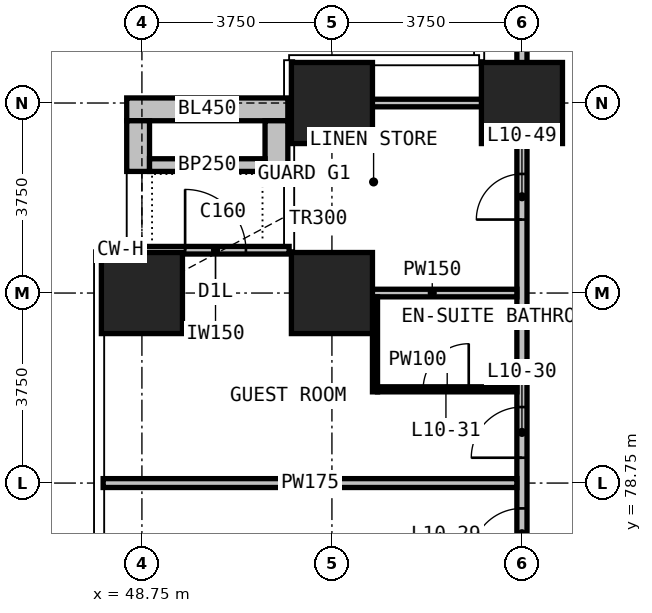
"""IFC4 building model, lengths in metres.
Left out: names, types, materials, properties, quantities, classifications, styles, units other than length and angle.
Written with IfcOpenShell. Run it as: python <this file> out.ifc"""

import sys

from ifc_helpers import new_model, si_unit, direction, frame, frame_2d, origin, origin_2d, place, context, subcontext, project, spatial, rectangle, extrude, element, fill, save


model = new_model("IFC4")
c1 = context("Model", 3, precision=1e-05, world=origin(), true_north=direction((0.0, 1.0)))
c2 = subcontext(c1, "Body", "Model", "MODEL_VIEW")
j1 = project(units=[si_unit("LENGTHUNIT", "METRE"), si_unit("PLANEANGLEUNIT", "RADIAN")], contexts=[c1])
p1 = place(None, origin())
s1 = spatial("IfcSite", under=j1, at=p1, CompositionType="ELEMENT")
p2 = place(p1, origin())
s2 = spatial("IfcBuilding", under=s1, at=p2, CompositionType="ELEMENT")
p3 = place(p2, frame((0.0, 0.0, 52.7)))
s3 = spatial("IfcBuildingStorey", under=s2, at=p3, CompositionType="ELEMENT", Elevation=52.7)
for number, where, z_axis, x_axis in (
    (1, (48.75, 82.5, 0.0), (0.0, 0.0, 1.0), (1.0, 0.0, 0.0)),
    (2, (52.5, 82.5, 0.0), (0.0, 0.0, 1.0), (1.0, 0.0, 0.0)),
    (3, (52.5, 86.25, 0.0), (0.0, 0.0, 1.0), (1.0, 0.0, 0.0)),
    (4, (56.25, 86.25, 0.0), (0.0, 0.0, 1.0), (1.0, 0.0, 0.0)),
):
    element("IfcColumn", number, at=place(p3, frame(where, z_axis=z_axis, x_axis=x_axis)), inside=s3, PredefinedType="COLUMN", context=c2, shape_type="SweptSolid", body=[
        extrude(rectangle(XDim=1.6, YDim=1.6, at=origin_2d()), origin(), (0.0, 0.0, 1.0), 3.3),
    ])
p4 = place(p3, frame((48.75, 83.345, 0.0), z_axis=(0.0, 0.0, 1.0), x_axis=(1.0, 0.0, 0.0)))
e5 = element("IfcWall", 5, at=p4, inside=s3, PredefinedType="SOLIDWALL", context=c2, shape_type="SweptSolid", body=[
    extrude(rectangle(XDim=2.905, YDim=0.15, at=frame_2d((1.453, 0.0))), origin(), (0.0, 0.0, 1.0), 3.0),
])
p5 = place(p4, frame((0.853, 0.0, 0.0)))
e6 = element("IfcOpeningElement", 6, at=p5, cuts=e5, PredefinedType="OPENING", context=c2, shape_type="SweptSolid", body=[
    extrude(rectangle(XDim=1.2, YDim=2.0, at=frame_2d((0.6, 1.0))), frame((0.0, 0.085, 0.0), z_axis=(0.0, -1.0, 0.0), x_axis=(1.0, 0.0, 0.0)), (0.0, 0.0, 1.0), 0.17),
])
p6 = place(p3, frame((48.45, 86.125, 0.0), z_axis=(0.0, 0.0, 1.0), x_axis=(1.0, 0.0, 0.0)))
e7 = element("IfcWall", 7, at=p6, inside=s3, PredefinedType="USERDEFINED", context=c2, shape_type="SweptSolid", body=[
    extrude(rectangle(XDim=3.18, YDim=0.45, at=frame_2d((1.59, 0.0))), origin(), (0.0, 0.0, 1.0), 1.1),
])
for number, where, z_axis, x_axis in (
    (8, (48.675, 84.9, 0.0), (0.0, 0.0, 1.0), (0.0, 1.0, 0.0)),
    (9, (51.405, 84.9, 0.0), (0.0, 0.0, 1.0), (0.0, 1.0, 0.0)),
):
    element("IfcWall", number, at=place(p3, frame(where, z_axis=z_axis, x_axis=x_axis)), inside=s3, PredefinedType="USERDEFINED", context=c2, shape_type="SweptSolid", body=[
        extrude(rectangle(XDim=1.0, YDim=0.45, at=frame_2d((0.5, 0.0))), origin(), (0.0, 0.0, 1.0), 1.1),
    ])
p7 = place(p3, frame((48.9, 85.025, 0.0), z_axis=(0.0, 0.0, 1.0), x_axis=(1.0, 0.0, 0.0)))
e10 = element("IfcWall", 10, at=p7, inside=s3, PredefinedType="USERDEFINED", context=c2, shape_type="SweptSolid", body=[
    extrude(rectangle(XDim=2.28, YDim=0.25, at=frame_2d((1.14, 0.0))), origin(), (0.0, 0.0, 1.0), 1.0),
])
p8 = place(p3, frame((56.25, 52.4, 0.0), z_axis=(0.0, 0.0, 1.0), x_axis=(0.0, 1.0, 0.0)))
e11 = element("IfcWall", 11, at=p8, inside=s3, PredefinedType="PARTITIONING", context=c2, shape_type="SweptSolid", body=[
    extrude(rectangle(XDim=33.925, YDim=0.2, at=frame_2d((16.962, 0.0))), origin(), (0.0, 0.0, 1.0), 3.0),
])
p9 = place(p8, frame((2.35, 0.0, 0.0)))
e12 = element("IfcOpeningElement", 12, at=p9, cuts=e11, PredefinedType="OPENING", context=c2, shape_type="SweptSolid", body=[
    extrude(rectangle(XDim=1.0, YDim=2.2, at=frame_2d((0.5, 1.1))), frame((0.0, 0.11, 0.0), z_axis=(0.0, -1.0, 0.0), x_axis=(1.0, 0.0, 0.0)), (0.0, 0.0, 1.0), 0.22),
])
p10 = place(p8, frame((4.35, 0.0, 0.0)))
e13 = element("IfcOpeningElement", 13, at=p10, cuts=e11, PredefinedType="OPENING", context=c2, shape_type="SweptSolid", body=[
    extrude(rectangle(XDim=1.0, YDim=2.2, at=frame_2d((0.5, 1.1))), frame((0.0, 0.11, 0.0), z_axis=(0.0, -1.0, 0.0), x_axis=(1.0, 0.0, 0.0)), (0.0, 0.0, 1.0), 0.22),
])
p11 = place(p8, frame((9.85, 0.0, 0.0)))
e14 = element("IfcOpeningElement", 14, at=p11, cuts=e11, PredefinedType="OPENING", context=c2, shape_type="SweptSolid", body=[
    extrude(rectangle(XDim=1.0, YDim=2.2, at=frame_2d((0.5, 1.1))), frame((0.0, 0.11, 0.0), z_axis=(0.0, -1.0, 0.0), x_axis=(1.0, 0.0, 0.0)), (0.0, 0.0, 1.0), 0.22),
])
p12 = place(p8, frame((11.85, 0.0, 0.0)))
e15 = element("IfcOpeningElement", 15, at=p12, cuts=e11, PredefinedType="OPENING", context=c2, shape_type="SweptSolid", body=[
    extrude(rectangle(XDim=1.0, YDim=2.2, at=frame_2d((0.5, 1.1))), frame((0.0, 0.11, 0.0), z_axis=(0.0, -1.0, 0.0), x_axis=(1.0, 0.0, 0.0)), (0.0, 0.0, 1.0), 0.22),
])
p13 = place(p8, frame((17.35, 0.0, 0.0)))
e16 = element("IfcOpeningElement", 16, at=p13, cuts=e11, PredefinedType="OPENING", context=c2, shape_type="SweptSolid", body=[
    extrude(rectangle(XDim=1.0, YDim=2.2, at=frame_2d((0.5, 1.1))), frame((0.0, 0.11, 0.0), z_axis=(0.0, -1.0, 0.0), x_axis=(1.0, 0.0, 0.0)), (0.0, 0.0, 1.0), 0.22),
])
p14 = place(p8, frame((19.35, 0.0, 0.0)))
e17 = element("IfcOpeningElement", 17, at=p14, cuts=e11, PredefinedType="OPENING", context=c2, shape_type="SweptSolid", body=[
    extrude(rectangle(XDim=1.0, YDim=2.2, at=frame_2d((0.5, 1.1))), frame((0.0, 0.11, 0.0), z_axis=(0.0, -1.0, 0.0), x_axis=(1.0, 0.0, 0.0)), (0.0, 0.0, 1.0), 0.22),
])
p15 = place(p8, frame((24.85, 0.0, 0.0)))
e18 = element("IfcOpeningElement", 18, at=p15, cuts=e11, PredefinedType="OPENING", context=c2, shape_type="SweptSolid", body=[
    extrude(rectangle(XDim=1.0, YDim=2.2, at=frame_2d((0.5, 1.1))), frame((0.0, 0.11, 0.0), z_axis=(0.0, -1.0, 0.0), x_axis=(1.0, 0.0, 0.0)), (0.0, 0.0, 1.0), 0.22),
])
p16 = place(p8, frame((26.85, 0.0, 0.0)))
e19 = element("IfcOpeningElement", 19, at=p16, cuts=e11, PredefinedType="OPENING", context=c2, shape_type="SweptSolid", body=[
    extrude(rectangle(XDim=1.0, YDim=2.2, at=frame_2d((0.5, 1.1))), frame((0.0, 0.11, 0.0), z_axis=(0.0, -1.0, 0.0), x_axis=(1.0, 0.0, 0.0)), (0.0, 0.0, 1.0), 0.22),
])
p17 = place(p8, frame((31.55, 0.0, 0.0)))
e20 = element("IfcOpeningElement", 20, at=p17, cuts=e11, PredefinedType="OPENING", context=c2, shape_type="SweptSolid", body=[
    extrude(rectangle(XDim=0.9, YDim=2.2, at=frame_2d((0.45, 1.1))), frame((0.0, 0.11, 0.0), z_axis=(0.0, -1.0, 0.0), x_axis=(1.0, 0.0, 0.0)), (0.0, 0.0, 1.0), 0.22),
])
p18 = place(p3, frame((56.25, 86.28, 0.0), z_axis=(0.0, 0.0, 1.0), x_axis=(0.0, 1.0, 0.0)))
e21 = element("IfcWall", 21, at=p18, inside=s3, PredefinedType="PARTITIONING", context=c2, shape_type="SweptSolid", body=[
    extrude(rectangle(XDim=4.365, YDim=0.2, at=frame_2d((2.183, 0.0))), origin(), (0.0, 0.0, 1.0), 3.0),
])
p19 = place(p3, frame((47.985, 78.75, 0.0), z_axis=(0.0, 0.0, 1.0), x_axis=(1.0, 0.0, 0.0)))
e22 = element("IfcWall", 22, at=p19, inside=s3, PredefinedType="PARTITIONING", context=c2, shape_type="SweptSolid", body=[
    extrude(rectangle(XDim=8.165, YDim=0.175, at=frame_2d((4.083, 0.0))), origin(), (0.0, 0.0, 1.0), 3.0),
])
p20 = place(p3, frame((52.81, 82.5, 0.0), z_axis=(0.0, 0.0, 1.0), x_axis=(1.0, 0.0, 0.0)))
e23 = element("IfcWall", 23, at=p20, inside=s3, PredefinedType="PARTITIONING", context=c2, shape_type="SweptSolid", body=[
    extrude(rectangle(XDim=3.34, YDim=0.15, at=frame_2d((1.67, 0.0))), origin(), (0.0, 0.0, 1.0), 3.0),
])
p21 = place(p3, frame((51.855, 86.25, 0.0), z_axis=(0.0, 0.0, 1.0), x_axis=(1.0, 0.0, 0.0)))
e24 = element("IfcWall", 24, at=p21, inside=s3, PredefinedType="PARTITIONING", context=c2, shape_type="SweptSolid", body=[
    extrude(rectangle(XDim=4.295, YDim=0.15, at=frame_2d((2.147, 0.0))), origin(), (0.0, 0.0, 1.0), 3.0),
])
p22 = place(p3, frame((52.735, 82.425, 0.0), z_axis=(0.0, 0.0, 1.0), x_axis=(0.0, 1.0, 0.0)))
e25 = element("IfcWall", 25, at=p22, inside=s3, PredefinedType="PARTITIONING", context=c2, shape_type="SweptSolid", body=[
    extrude(rectangle(XDim=0.84, YDim=0.15, at=frame_2d((0.42, 0.0))), origin(), (0.0, 0.0, 1.0), 3.0),
])
p23 = place(p3, frame((53.4, 80.6, 0.0), z_axis=(0.0, 0.0, 1.0), x_axis=(1.0, 0.0, 0.0)))
e26 = element("IfcWall", 26, at=p23, inside=s3, PredefinedType="PARTITIONING", context=c2, shape_type="SweptSolid", body=[
    extrude(rectangle(XDim=2.75, YDim=0.1, at=frame_2d((1.375, 0.0))), origin(), (0.0, 0.0, 1.0), 3.0),
])
p24 = place(p23, frame((0.9, 0.0, 0.0)))
e27 = element("IfcOpeningElement", 27, at=p24, cuts=e26, PredefinedType="OPENING", context=c2, shape_type="SweptSolid", body=[
    extrude(rectangle(XDim=0.9, YDim=2.2, at=frame_2d((0.45, 1.1))), frame((0.0, 0.06, 0.0), z_axis=(0.0, -1.0, 0.0), x_axis=(1.0, 0.0, 0.0)), (0.0, 0.0, 1.0), 0.12),
])
p25 = place(p3, frame((53.35, 80.55, 0.0), z_axis=(0.0, 0.0, 1.0), x_axis=(0.0, 1.0, 0.0)))
e28 = element("IfcWall", 28, at=p25, inside=s3, PredefinedType="PARTITIONING", context=c2, shape_type="SweptSolid", body=[
    extrude(rectangle(XDim=1.875, YDim=0.1, at=frame_2d((0.938, 0.0))), origin(), (0.0, 0.0, 1.0), 3.0),
])
p26 = place(p5, origin())
e29 = element("IfcDoor", 29, at=p26, inside=s3, OperationType="SINGLE_SWING_LEFT", PredefinedType="DOOR", context=c2, shape_type="SweptSolid", body=[
    extrude(rectangle(XDim=1.2, YDim=2.0, at=frame_2d((0.6, 1.0))), frame((0.0, 0.025, 0.0), z_axis=(0.0, -1.0, 0.0), x_axis=(1.0, 0.0, 0.0)), (0.0, 0.0, 1.0), 0.05),
])
fill(e6, e29)
p27 = place(p15, origin())
e30 = element("IfcDoor", 30, at=p27, inside=s3, OperationType="SINGLE_SWING_LEFT", PredefinedType="DOOR", context=c2, shape_type="SweptSolid", body=[
    extrude(rectangle(XDim=1.0, YDim=2.2, at=frame_2d((0.5, 1.1))), frame((0.0, 0.025, 0.0), z_axis=(0.0, -1.0, 0.0), x_axis=(1.0, 0.0, 0.0)), (0.0, 0.0, 1.0), 0.05),
])
fill(e18, e30)
p28 = place(p16, origin())
e31 = element("IfcDoor", 31, at=p28, inside=s3, OperationType="SINGLE_SWING_RIGHT", PredefinedType="DOOR", context=c2, shape_type="SweptSolid", body=[
    extrude(rectangle(XDim=1.0, YDim=2.2, at=frame_2d((0.5, 1.1))), frame((0.0, 0.025, 0.0), z_axis=(0.0, -1.0, 0.0), x_axis=(1.0, 0.0, 0.0)), (0.0, 0.0, 1.0), 0.05),
])
fill(e19, e31)
p29 = place(p24, origin())
e32 = element("IfcDoor", 32, at=p29, inside=s3, OperationType="SINGLE_SWING_RIGHT", PredefinedType="DOOR", context=c2, shape_type="SweptSolid", body=[
    extrude(rectangle(XDim=0.9, YDim=2.2, at=frame_2d((0.45, 1.1))), frame((0.0, 0.025, 0.0), z_axis=(0.0, -1.0, 0.0), x_axis=(1.0, 0.0, 0.0)), (0.0, 0.0, 1.0), 0.05),
])
fill(e27, e32)
p30 = place(p17, origin())
e33 = element("IfcDoor", 33, at=p30, inside=s3, OperationType="SINGLE_SWING_LEFT", PredefinedType="DOOR", context=c2, shape_type="SweptSolid", body=[
    extrude(rectangle(XDim=0.9, YDim=2.2, at=frame_2d((0.45, 1.1))), frame((0.0, 0.025, 0.0), z_axis=(0.0, -1.0, 0.0), x_axis=(1.0, 0.0, 0.0)), (0.0, 0.0, 1.0), 0.05),
])
fill(e20, e33)
save(model, sys.argv[1])
